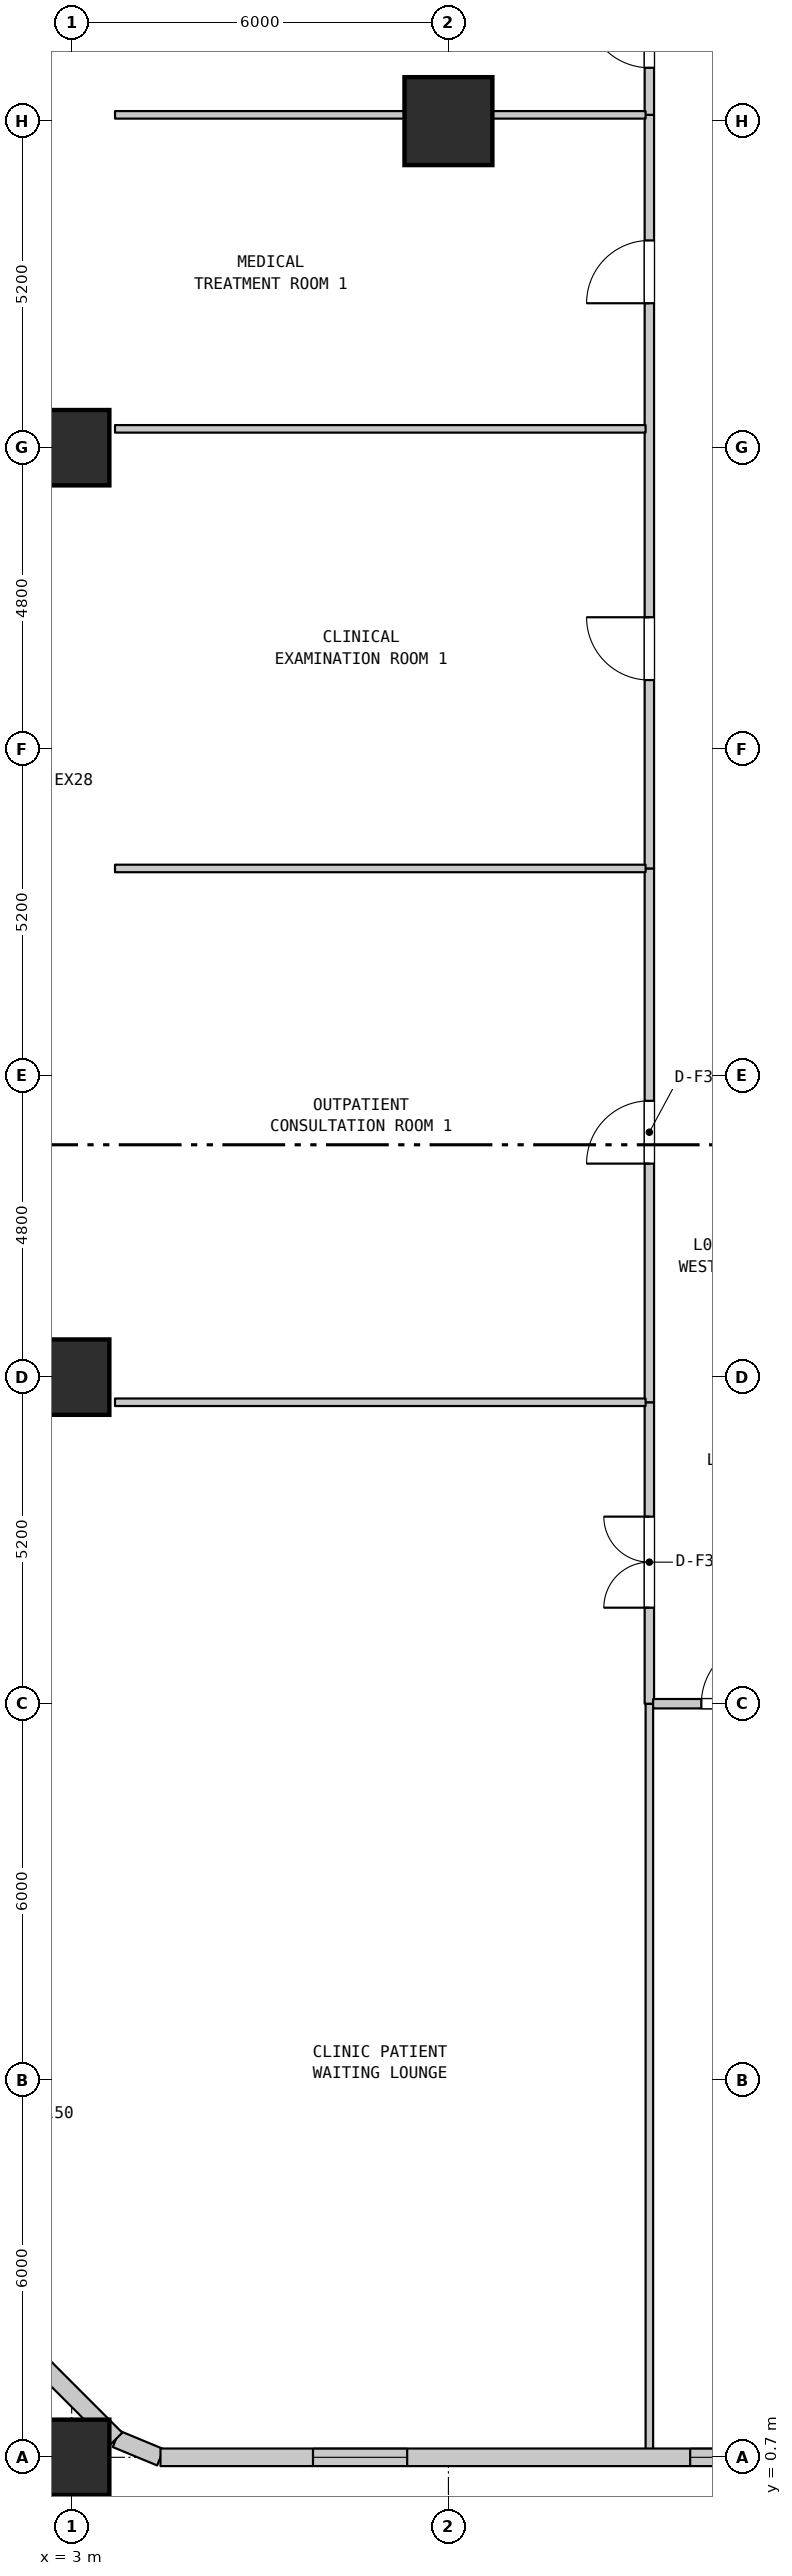
"""IFC4 building model, lengths in metres.
Left out: names, types, materials, properties, quantities, classifications, styles, units other than length and angle.
Written with IfcOpenShell. Run it as: python <this file> out.ifc"""

import sys

from ifc_helpers import new_model, si_unit, direction, frame, frame_2d, origin, origin_2d, place, context, subcontext, project, spatial, rectangle, extrude, element, fill, save


model = new_model("IFC4")
c1 = context("Model", 3, precision=1e-05, world=origin(), true_north=direction((0.0, 1.0)))
c2 = subcontext(c1, "Body", "Model", "MODEL_VIEW")
j1 = project(units=[si_unit("LENGTHUNIT", "METRE"), si_unit("PLANEANGLEUNIT", "RADIAN")], contexts=[c1])
p1 = place(None, origin())
s1 = spatial("IfcSite", under=j1, at=p1, CompositionType="ELEMENT")
p2 = place(p1, origin())
s2 = spatial("IfcBuilding", under=s1, at=p2, CompositionType="ELEMENT")
p3 = place(p2, frame((0.0, 0.0, 13.0)))
s3 = spatial("IfcBuildingStorey", under=s2, at=p3, CompositionType="ELEMENT", Elevation=13.0)
for number, where, z_axis, x_axis in (
    (1, (3.0, 0.7, 0.0), (0.0, 0.0, 1.0), (1.0, 0.0, 0.0)),
    (2, (3.0, 17.9, 0.0), (0.0, 0.0, 1.0), (1.0, 0.0, 0.0)),
    (3, (3.0, 32.7, 0.0), (0.0, 0.0, 1.0), (1.0, 0.0, 0.0)),
):
    element("IfcColumn", number, at=place(p3, frame(where, z_axis=z_axis, x_axis=x_axis)), inside=s3, PredefinedType="PILASTER", context=c2, shape_type="SweptSolid", body=[
        extrude(rectangle(XDim=1.2, YDim=1.2, at=origin_2d()), origin(), (0.0, 0.0, 1.0), 6.0),
    ])
p4 = place(p3, frame((9.0, 37.9, 0.0), z_axis=(0.0, 0.0, 1.0), x_axis=(1.0, 0.0, 0.0)))
e4 = element("IfcColumn", 4, at=p4, inside=s3, PredefinedType="COLUMN", context=c2, shape_type="SweptSolid", body=[
    extrude(rectangle(XDim=1.4, YDim=1.4, at=origin_2d()), origin(), (0.0, 0.0, 1.0), 6.0),
])
p5 = place(p3, frame((4.414, 0.7, 0.0), z_axis=(0.0, 0.0, 1.0), x_axis=(-0.92383017907, 0.382802560388, 0.0)))
e5 = element("IfcWall", 5, at=p5, inside=s3, PredefinedType="STANDARD", context=c2, shape_type="SweptSolid", body=[
    extrude(rectangle(XDim=0.765, YDim=0.28, at=frame_2d((0.383, 0.0))), origin(), (0.0, 0.0, 1.0), 5.58),
])
p6 = place(p3, frame((3.707, 0.993, 0.0), z_axis=(0.0, 0.0, 1.0), x_axis=(-0.707106781187, 0.707106781187, 0.0)))
e6 = element("IfcWall", 6, at=p6, inside=s3, PredefinedType="STANDARD", context=c2, shape_type="SweptSolid", body=[
    extrude(rectangle(XDim=2.0, YDim=0.28, at=frame_2d((1.0, 0.0))), origin(), (0.0, 0.0, 1.0), 5.58),
])
p7 = place(p3, frame((12.2, 0.71, 0.0), z_axis=(0.0, 0.0, 1.0), x_axis=(0.0, 1.0, 0.0)))
e7 = element("IfcWall", 7, at=p7, inside=s3, PredefinedType="PARTITIONING", context=c2, shape_type="SweptSolid", body=[
    extrude(rectangle(XDim=11.99, YDim=0.12, at=frame_2d((5.995, 0.0))), origin(), (0.0, 0.0, 1.0), 5.58),
])
p8 = place(p3, frame((12.2, 12.7, 0.0), z_axis=(0.0, 0.0, 1.0), x_axis=(0.0, 1.0, 0.0)))
e8 = element("IfcWall", 8, at=p8, inside=s3, PredefinedType="STANDARD", context=c2, shape_type="SweptSolid", body=[
    extrude(rectangle(XDim=4.8, YDim=0.15, at=frame_2d((2.4, 0.0))), origin(), (0.0, 0.0, 1.0), 5.58),
])
p9 = place(p8, frame((1.529, 0.0, 0.0)))
e9 = element("IfcOpeningElement", 9, at=p9, cuts=e8, PredefinedType="OPENING", context=c2, shape_type="SweptSolid", body=[
    extrude(rectangle(XDim=1.45, YDim=2.2, at=frame_2d((0.725, 1.1))), frame((0.0, 0.085, 0.0), z_axis=(0.0, -1.0, 0.0), x_axis=(1.0, 0.0, 0.0)), (0.0, 0.0, 1.0), 0.17),
])
p10 = place(p3, frame((12.2, 17.5, 0.0), z_axis=(0.0, 0.0, 1.0), x_axis=(0.0, 1.0, 0.0)))
e10 = element("IfcWall", 10, at=p10, inside=s3, PredefinedType="STANDARD", context=c2, shape_type="SweptSolid", body=[
    extrude(rectangle(XDim=8.5, YDim=0.15, at=frame_2d((4.25, 0.0))), origin(), (0.0, 0.0, 1.0), 5.58),
])
p11 = place(p10, frame((3.8, 0.0, 0.0)))
e11 = element("IfcOpeningElement", 11, at=p11, cuts=e10, PredefinedType="OPENING", context=c2, shape_type="SweptSolid", body=[
    extrude(rectangle(XDim=1.0, YDim=2.15, at=frame_2d((0.5, 1.075))), frame((0.0, 0.085, 0.0), z_axis=(0.0, -1.0, 0.0), x_axis=(1.0, 0.0, 0.0)), (0.0, 0.0, 1.0), 0.17),
])
p12 = place(p3, frame((12.2, 26.0, 0.0), z_axis=(0.0, 0.0, 1.0), x_axis=(0.0, 1.0, 0.0)))
e12 = element("IfcWall", 12, at=p12, inside=s3, PredefinedType="STANDARD", context=c2, shape_type="SweptSolid", body=[
    extrude(rectangle(XDim=12.0, YDim=0.15, at=frame_2d((6.0, 0.0))), origin(), (0.0, 0.0, 1.0), 5.58),
])
p13 = place(p12, frame((3.0, 0.0, 0.0)))
e13 = element("IfcOpeningElement", 13, at=p13, cuts=e12, PredefinedType="OPENING", context=c2, shape_type="SweptSolid", body=[
    extrude(rectangle(XDim=1.0, YDim=2.15, at=frame_2d((0.5, 1.075))), frame((0.0, 0.085, 0.0), z_axis=(0.0, -1.0, 0.0), x_axis=(1.0, 0.0, 0.0)), (0.0, 0.0, 1.0), 0.17),
])
p14 = place(p12, frame((9.0, 0.0, 0.0)))
e14 = element("IfcOpeningElement", 14, at=p14, cuts=e12, PredefinedType="OPENING", context=c2, shape_type="SweptSolid", body=[
    extrude(rectangle(XDim=1.0, YDim=2.15, at=frame_2d((0.5, 1.075))), frame((0.0, 0.085, 0.0), z_axis=(0.0, -1.0, 0.0), x_axis=(1.0, 0.0, 0.0)), (0.0, 0.0, 1.0), 0.17),
])
p15 = place(p3, frame((12.2, 38.0, 0.0), z_axis=(0.0, 0.0, 1.0), x_axis=(0.0, 1.0, 0.0)))
e15 = element("IfcWall", 15, at=p15, inside=s3, PredefinedType="STANDARD", context=c2, shape_type="SweptSolid", body=[
    extrude(rectangle(XDim=2.5, YDim=0.15, at=frame_2d((1.25, 0.0))), origin(), (0.0, 0.0, 1.0), 5.58),
])
p16 = place(p15, frame((0.75, 0.0, 0.0)))
e16 = element("IfcOpeningElement", 16, at=p16, cuts=e15, PredefinedType="OPENING", context=c2, shape_type="SweptSolid", body=[
    extrude(rectangle(XDim=1.0, YDim=2.15, at=frame_2d((0.5, 1.075))), frame((0.0, 0.085, 0.0), z_axis=(0.0, -1.0, 0.0), x_axis=(1.0, 0.0, 0.0)), (0.0, 0.0, 1.0), 0.17),
])
p17 = place(p3, frame((12.26, 12.7, 0.0), z_axis=(0.0, 0.0, 1.0), x_axis=(1.0, 0.0, 0.0)))
e17 = element("IfcWall", 17, at=p17, inside=s3, PredefinedType="STANDARD", context=c2, shape_type="SweptSolid", body=[
    extrude(rectangle(XDim=2.68, YDim=0.15, at=frame_2d((1.34, 0.0))), origin(), (0.0, 0.0, 1.0), 5.58),
])
p18 = place(p17, frame((0.768, 0.0, 0.0)))
e18 = element("IfcOpeningElement", 18, at=p18, cuts=e17, PredefinedType="OPENING", context=c2, shape_type="SweptSolid", body=[
    extrude(rectangle(XDim=1.0, YDim=2.15, at=frame_2d((0.5, 1.075))), frame((0.0, 0.085, 0.0), z_axis=(0.0, -1.0, 0.0), x_axis=(1.0, 0.0, 0.0)), (0.0, 0.0, 1.0), 0.17),
])
p19 = place(p3, frame((3.69, 17.5, 0.0), z_axis=(0.0, 0.0, 1.0), x_axis=(1.0, 0.0, 0.0)))
e19 = element("IfcWall", 19, at=p19, inside=s3, PredefinedType="PARTITIONING", context=c2, shape_type="SweptSolid", body=[
    extrude(rectangle(XDim=8.45, YDim=0.12, at=frame_2d((4.225, 0.0))), origin(), (0.0, 0.0, 1.0), 4.38),
])
for number, where, z_axis, x_axis in (
    (20, (3.69, 26.0, 0.0), (0.0, 0.0, 1.0), (1.0, 0.0, 0.0)),
    (21, (3.69, 33.0, 0.0), (0.0, 0.0, 1.0), (1.0, 0.0, 0.0)),
):
    element("IfcWall", number, at=place(p3, frame(where, z_axis=z_axis, x_axis=x_axis)), inside=s3, PredefinedType="PARTITIONING", context=c2, shape_type="SweptSolid", body=[
        extrude(rectangle(XDim=8.45, YDim=0.12, at=frame_2d((4.225, 0.0))), origin(), (0.0, 0.0, 1.0), 5.58),
    ])
p20 = place(p3, frame((3.69, 38.0, 0.0), z_axis=(0.0, 0.0, 1.0), x_axis=(1.0, 0.0, 0.0)))
e22 = element("IfcWall", 22, at=p20, inside=s3, PredefinedType="PARTITIONING", context=c2, shape_type="SweptSolid", body=[
    extrude(rectangle(XDim=5.31, YDim=0.12, at=frame_2d((2.655, 0.0))), origin(), (0.0, 0.0, 1.0), 5.58),
])
p21 = place(p3, frame((27.0, 0.7, 0.0), z_axis=(0.0, 0.0, 1.0), x_axis=(-1.0, 0.0, 0.0)))
e23 = element("IfcWall", 23, at=p21, inside=s3, PredefinedType="STANDARD", context=c2, shape_type="SweptSolid", body=[
    extrude(rectangle(XDim=22.586, YDim=0.28, at=frame_2d((11.293, 0.0))), origin(), (0.0, 0.0, 1.0), 5.58),
])
p22 = place(p21, frame((1.986, 0.0, 0.95)))
e24 = element("IfcOpeningElement", 24, at=p22, cuts=e23, PredefinedType="OPENING", context=c2, shape_type="SweptSolid", body=[
    extrude(rectangle(XDim=1.5, YDim=1.8, at=frame_2d((0.75, 0.9))), frame((0.0, 0.15, 0.0), z_axis=(0.0, -1.0, 0.0), x_axis=(1.0, 0.0, 0.0)), (0.0, 0.0, 1.0), 0.3),
])
p23 = place(p21, frame((7.543, 0.0, 0.95)))
e25 = element("IfcOpeningElement", 25, at=p23, cuts=e23, PredefinedType="OPENING", context=c2, shape_type="SweptSolid", body=[
    extrude(rectangle(XDim=1.5, YDim=1.8, at=frame_2d((0.75, 0.9))), frame((0.0, 0.15, 0.0), z_axis=(0.0, -1.0, 0.0), x_axis=(1.0, 0.0, 0.0)), (0.0, 0.0, 1.0), 0.3),
])
p24 = place(p21, frame((12.65, 0.0, 0.95)))
e26 = element("IfcOpeningElement", 26, at=p24, cuts=e23, PredefinedType="OPENING", context=c2, shape_type="SweptSolid", body=[
    extrude(rectangle(XDim=1.5, YDim=1.8, at=frame_2d((0.75, 0.9))), frame((0.0, 0.15, 0.0), z_axis=(0.0, -1.0, 0.0), x_axis=(1.0, 0.0, 0.0)), (0.0, 0.0, 1.0), 0.3),
])
p25 = place(p21, frame((18.657, 0.0, 0.95)))
e27 = element("IfcOpeningElement", 27, at=p25, cuts=e23, PredefinedType="OPENING", context=c2, shape_type="SweptSolid", body=[
    extrude(rectangle(XDim=1.5, YDim=1.8, at=frame_2d((0.75, 0.9))), frame((0.0, 0.15, 0.0), z_axis=(0.0, -1.0, 0.0), x_axis=(1.0, 0.0, 0.0)), (0.0, 0.0, 1.0), 0.3),
])
p26 = place(p3, frame((9.0, 38.0, 0.0), z_axis=(0.0, 0.0, 1.0), x_axis=(1.0, 0.0, 0.0)))
e28 = element("IfcWall", 28, at=p26, inside=s3, PredefinedType="PARTITIONING", context=c2, shape_type="SweptSolid", body=[
    extrude(rectangle(XDim=3.14, YDim=0.12, at=frame_2d((1.57, 0.0))), origin(), (0.0, 0.0, 1.0), 4.98),
])
p27 = place(p24, origin())
e29 = element("IfcWindow", 29, at=p27, inside=s3, PartitioningType="SINGLE_PANEL", PredefinedType="WINDOW", context=c2, shape_type="SweptSolid", body=[
    extrude(rectangle(XDim=1.5, YDim=1.8, at=frame_2d((0.75, 0.9))), frame((0.0, 0.03, 0.0), z_axis=(0.0, -1.0, 0.0), x_axis=(1.0, 0.0, 0.0)), (0.0, 0.0, 1.0), 0.06),
])
fill(e26, e29)
p28 = place(p25, origin())
e30 = element("IfcWindow", 30, at=p28, inside=s3, PartitioningType="SINGLE_PANEL", PredefinedType="WINDOW", context=c2, shape_type="SweptSolid", body=[
    extrude(rectangle(XDim=1.5, YDim=1.8, at=frame_2d((0.75, 0.9))), frame((0.0, 0.03, 0.0), z_axis=(0.0, -1.0, 0.0), x_axis=(1.0, 0.0, 0.0)), (0.0, 0.0, 1.0), 0.06),
])
fill(e27, e30)
p29 = place(p9, origin())
e31 = element("IfcDoor", 31, at=p29, inside=s3, OperationType="DOUBLE_DOOR_SINGLE_SWING", PredefinedType="DOOR", context=c2, shape_type="SweptSolid", body=[
    extrude(rectangle(XDim=1.45, YDim=2.2, at=frame_2d((0.725, 1.1))), frame((0.0, 0.025, 0.0), z_axis=(0.0, -1.0, 0.0), x_axis=(1.0, 0.0, 0.0)), (0.0, 0.0, 1.0), 0.05),
])
fill(e9, e31)
p30 = place(p11, origin())
e32 = element("IfcDoor", 32, at=p30, inside=s3, OperationType="SINGLE_SWING_LEFT", PredefinedType="DOOR", context=c2, shape_type="SweptSolid", body=[
    extrude(rectangle(XDim=1.0, YDim=2.15, at=frame_2d((0.5, 1.075))), frame((0.0, 0.025, 0.0), z_axis=(0.0, -1.0, 0.0), x_axis=(1.0, 0.0, 0.0)), (0.0, 0.0, 1.0), 0.05),
])
fill(e11, e32)
p31 = place(p13, origin())
e33 = element("IfcDoor", 33, at=p31, inside=s3, OperationType="SINGLE_SWING_RIGHT", PredefinedType="DOOR", context=c2, shape_type="SweptSolid", body=[
    extrude(rectangle(XDim=1.0, YDim=2.15, at=frame_2d((0.5, 1.075))), frame((0.0, 0.025, 0.0), z_axis=(0.0, -1.0, 0.0), x_axis=(1.0, 0.0, 0.0)), (0.0, 0.0, 1.0), 0.05),
])
fill(e13, e33)
p32 = place(p14, origin())
e34 = element("IfcDoor", 34, at=p32, inside=s3, OperationType="SINGLE_SWING_LEFT", PredefinedType="DOOR", context=c2, shape_type="SweptSolid", body=[
    extrude(rectangle(XDim=1.0, YDim=2.15, at=frame_2d((0.5, 1.075))), frame((0.0, 0.025, 0.0), z_axis=(0.0, -1.0, 0.0), x_axis=(1.0, 0.0, 0.0)), (0.0, 0.0, 1.0), 0.05),
])
fill(e14, e34)
p33 = place(p16, origin())
e35 = element("IfcDoor", 35, at=p33, inside=s3, OperationType="SINGLE_SWING_RIGHT", PredefinedType="DOOR", context=c2, shape_type="SweptSolid", body=[
    extrude(rectangle(XDim=1.0, YDim=2.15, at=frame_2d((0.5, 1.075))), frame((0.0, 0.025, 0.0), z_axis=(0.0, -1.0, 0.0), x_axis=(1.0, 0.0, 0.0)), (0.0, 0.0, 1.0), 0.05),
])
fill(e16, e35)
p34 = place(p18, origin())
e36 = element("IfcDoor", 36, at=p34, inside=s3, OperationType="SINGLE_SWING_RIGHT", PredefinedType="DOOR", context=c2, shape_type="SweptSolid", body=[
    extrude(rectangle(XDim=1.0, YDim=2.15, at=frame_2d((0.5, 1.075))), frame((0.0, 0.025, 0.0), z_axis=(0.0, -1.0, 0.0), x_axis=(1.0, 0.0, 0.0)), (0.0, 0.0, 1.0), 0.05),
])
fill(e18, e36)
save(model, sys.argv[1])
